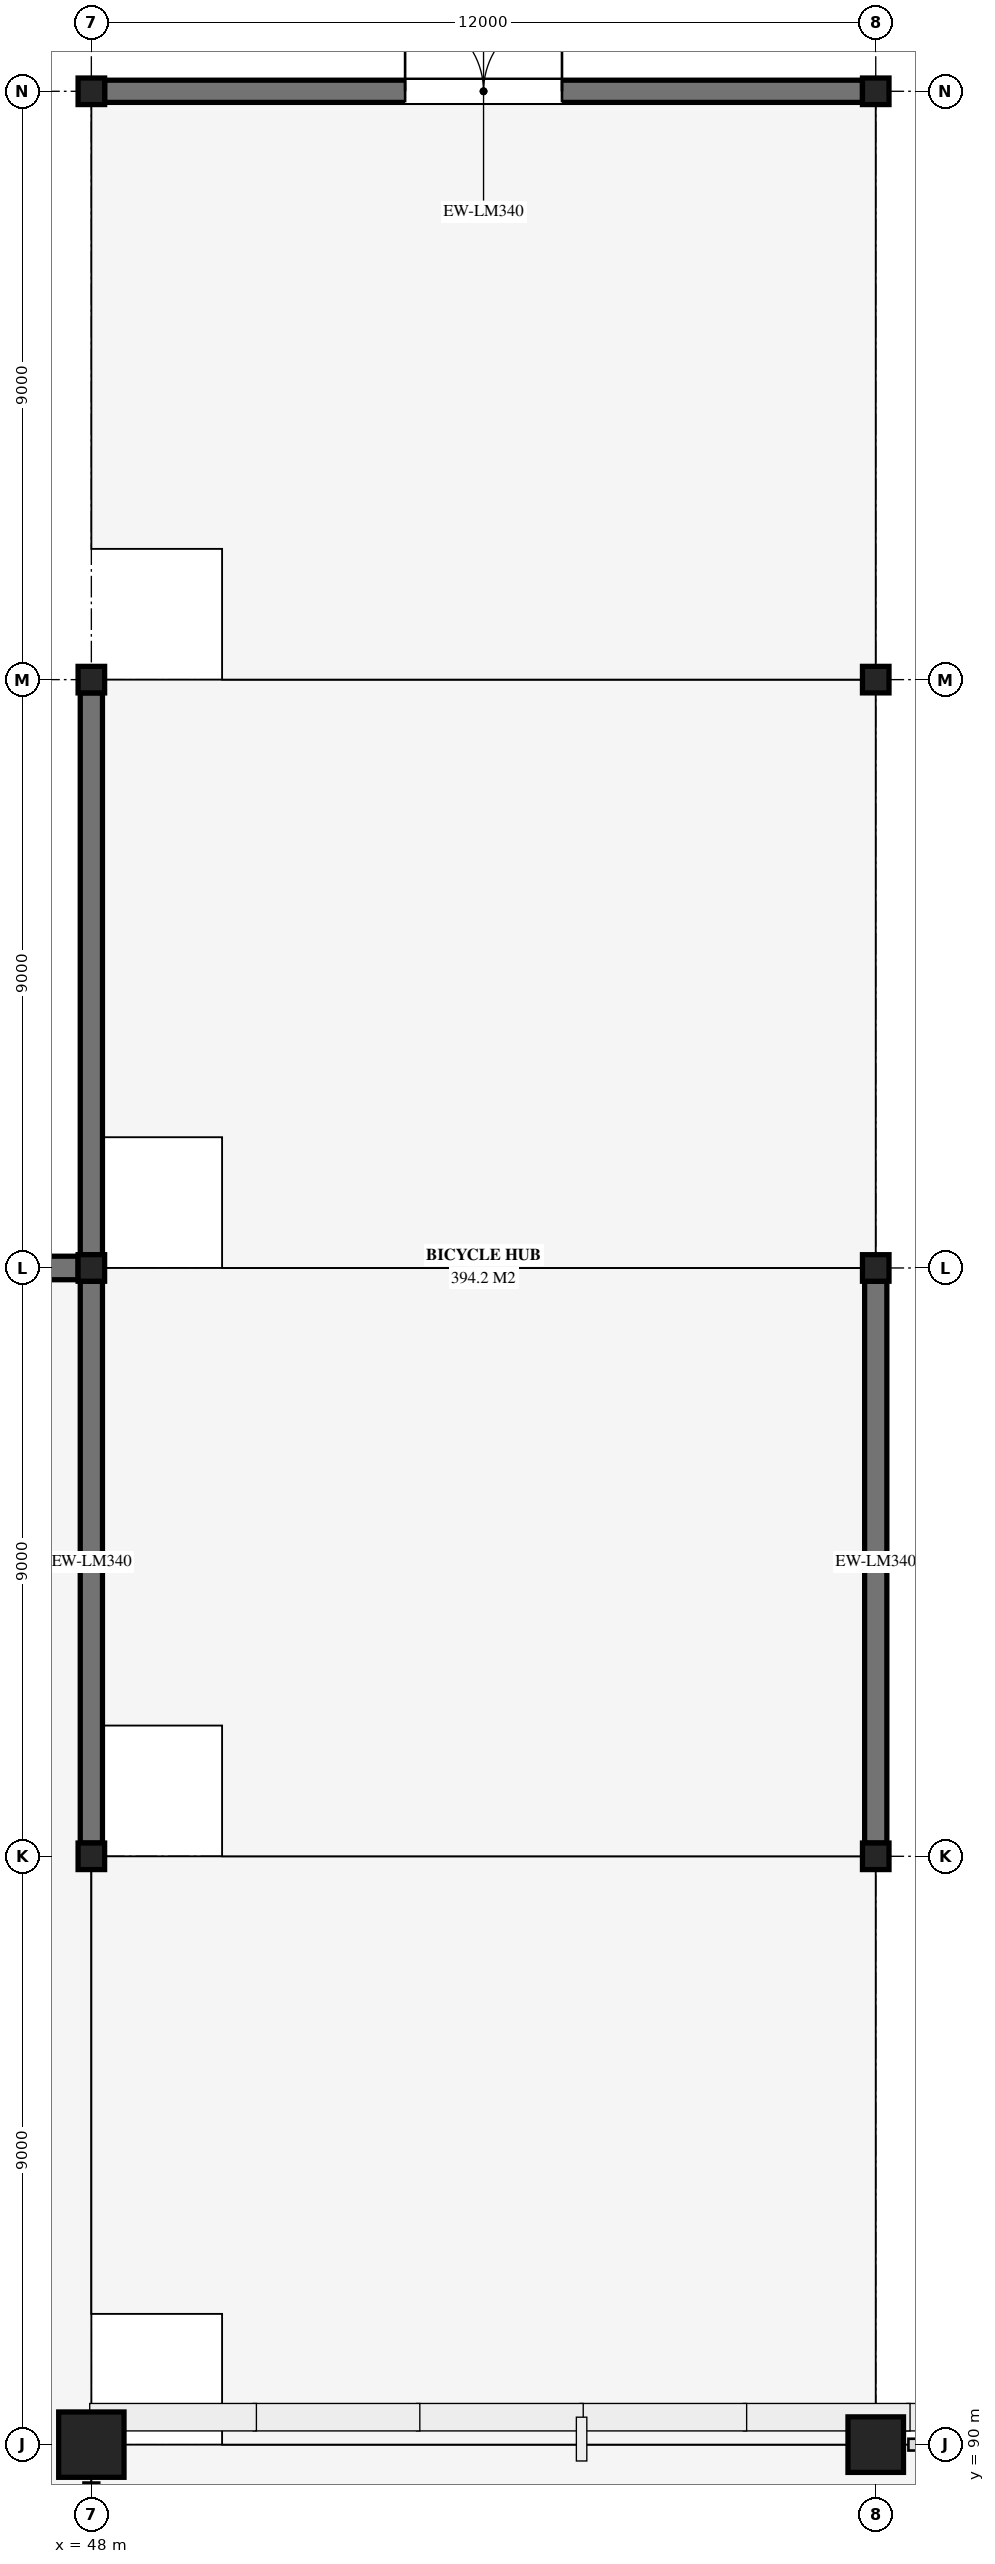
"""IFC4 building model, lengths in metres.
Left out: names, types, materials, properties, quantities, classifications, styles, units other than length and angle.
Written with IfcOpenShell. Run it as: python <this file> out.ifc"""

import sys

from ifc_helpers import new_model, si_unit, direction, frame, frame_2d, origin, origin_2d, place, context, subcontext, project, spatial, rectangle, hollow_circle, extrude, element, fill, save


model = new_model("IFC4")
c1 = context("Model", 3, precision=1e-05, world=origin(), true_north=direction((0.0, 1.0)))
c2 = subcontext(c1, "Body", "Model", "MODEL_VIEW")
j1 = project(units=[si_unit("LENGTHUNIT", "METRE"), si_unit("PLANEANGLEUNIT", "RADIAN")], contexts=[c1])
p1 = place(None, origin())
s1 = spatial("IfcSite", under=j1, at=p1, CompositionType="ELEMENT")
p2 = place(p1, origin())
s2 = spatial("IfcBuilding", under=s1, at=p2, CompositionType="ELEMENT")
p3 = place(p2, origin())
s3 = spatial("IfcBuildingStorey", under=s2, at=p3, CompositionType="ELEMENT", Elevation=0.0)
p4 = place(p3, frame((48.0, 90.0, 0.0), z_axis=(0.0, 0.0, 1.0), x_axis=(1.0, 0.0, 0.0)))
e1 = element("IfcColumn", 1, at=p4, inside=s3, PredefinedType="COLUMN", context=c2, shape_type="SweptSolid", body=[
    extrude(rectangle(XDim=1.0, YDim=1.0, at=origin_2d()), origin(), (0.0, 0.0, 1.0), 5.24),
])
for number, where, z_axis, x_axis in (
    (2, (48.0, 99.0, 0.0), (0.0, 0.0, 1.0), (1.0, 0.0, 0.0)),
    (3, (48.0, 108.0, 0.0), (0.0, 0.0, 1.0), (1.0, 0.0, 0.0)),
    (4, (48.0, 117.0, 0.0), (0.0, 0.0, 1.0), (1.0, 0.0, 0.0)),
    (5, (48.0, 126.0, 0.0), (0.0, 0.0, 1.0), (1.0, 0.0, 0.0)),
):
    element("IfcColumn", number, at=place(p3, frame(where, z_axis=z_axis, x_axis=x_axis)), inside=s3, PredefinedType="COLUMN", context=c2, shape_type="SweptSolid", body=[
        extrude(hollow_circle(Radius=0.203, WallThickness=0.016, at=origin_2d()), origin(), (0.0, 0.0, 1.0), 5.24),
    ])
p5 = place(p3, frame((60.0, 90.0, 0.0), z_axis=(0.0, 0.0, 1.0), x_axis=(1.0, 0.0, 0.0)))
e6 = element("IfcColumn", 6, at=p5, inside=s3, PredefinedType="COLUMN", context=c2, shape_type="SweptSolid", body=[
    extrude(rectangle(XDim=0.85, YDim=0.85, at=origin_2d()), origin(), (0.0, 0.0, 1.0), 5.24),
])
for number, where, z_axis, x_axis in (
    (7, (60.0, 99.0, 0.0), (0.0, 0.0, 1.0), (1.0, 0.0, 0.0)),
    (8, (60.0, 108.0, 0.0), (0.0, 0.0, 1.0), (1.0, 0.0, 0.0)),
    (9, (60.0, 117.0, 0.0), (0.0, 0.0, 1.0), (1.0, 0.0, 0.0)),
    (10, (60.0, 126.0, 0.0), (0.0, 0.0, 1.0), (1.0, 0.0, 0.0)),
):
    element("IfcColumn", number, at=place(p3, frame(where, z_axis=z_axis, x_axis=x_axis)), inside=s3, PredefinedType="COLUMN", context=c2, shape_type="SweptSolid", body=[
        extrude(hollow_circle(Radius=0.203, WallThickness=0.016, at=origin_2d()), origin(), (0.0, 0.0, 1.0), 5.24),
    ])
p6 = place(p3, frame((40.225, 108.0, 0.0), z_axis=(0.0, 0.0, 1.0), x_axis=(1.0, 0.0, 0.0)))
e11 = element("IfcWall", 11, at=p6, inside=s3, PredefinedType="SOLIDWALL", context=c2, shape_type="SweptSolid", body=[
    extrude(rectangle(XDim=7.572, YDim=0.36, at=frame_2d((3.786, 0.0))), origin(), (0.0, 0.0, 1.0), 5.06),
])
p7 = place(p6, frame((1.086, 0.0, 0.0)))
e12 = element("IfcOpeningElement", 12, at=p7, cuts=e11, PredefinedType="OPENING", context=c2, shape_type="SweptSolid", body=[
    extrude(rectangle(XDim=5.4, YDim=4.5, at=frame_2d((2.7, 2.25))), frame((0.0, 0.19, 0.0), z_axis=(0.0, -1.0, 0.0), x_axis=(1.0, 0.0, 0.0)), (0.0, 0.0, 1.0), 0.38),
])
p8 = place(p3, frame((48.203, 126.0, 0.0), z_axis=(0.0, 0.0, 1.0), x_axis=(1.0, 0.0, 0.0)))
e13 = element("IfcWall", 13, at=p8, inside=s3, PredefinedType="SOLIDWALL", context=c2, shape_type="SweptSolid", body=[
    extrude(rectangle(XDim=11.594, YDim=0.34, at=frame_2d((5.797, 0.0))), origin(), (0.0, 0.0, 1.0), 5.06),
])
p9 = place(p8, frame((4.597, 0.0, 0.0)))
e14 = element("IfcOpeningElement", 14, at=p9, cuts=e13, PredefinedType="OPENING", context=c2, shape_type="SweptSolid", body=[
    extrude(rectangle(XDim=2.4, YDim=2.3, at=frame_2d((1.2, 1.15))), frame((0.0, 0.18, 0.0), z_axis=(0.0, -1.0, 0.0), x_axis=(1.0, 0.0, 0.0)), (0.0, 0.0, 1.0), 0.36),
])
for number, where, z_axis, x_axis in (
    (15, (48.0, 99.203, 0.0), (0.0, 0.0, 1.0), (0.0, 1.0, 0.0)),
    (16, (48.0, 108.203, 0.0), (0.0, 0.0, 1.0), (0.0, 1.0, 0.0)),
    (17, (60.0, 99.203, 0.0), (0.0, 0.0, 1.0), (0.0, 1.0, 0.0)),
):
    element("IfcWall", number, at=place(p3, frame(where, z_axis=z_axis, x_axis=x_axis)), inside=s3, PredefinedType="SOLIDWALL", context=c2, shape_type="SweptSolid", body=[
        extrude(rectangle(XDim=8.594, YDim=0.34, at=frame_2d((4.297, 0.0))), origin(), (0.0, 0.0, 1.0), 5.06),
    ])
p10 = place(p9, origin())
e18 = element("IfcDoor", 18, at=p10, inside=s3, OperationType="DOUBLE_DOOR_SINGLE_SWING", PredefinedType="DOOR", context=c2, shape_type="SweptSolid", body=[
    extrude(rectangle(XDim=2.4, YDim=2.3, at=frame_2d((1.2, 1.15))), frame((0.0, 0.025, 0.0), z_axis=(0.0, -1.0, 0.0), x_axis=(1.0, 0.0, 0.0)), (0.0, 0.0, 1.0), 0.05),
])
fill(e14, e18)
save(model, sys.argv[1])
